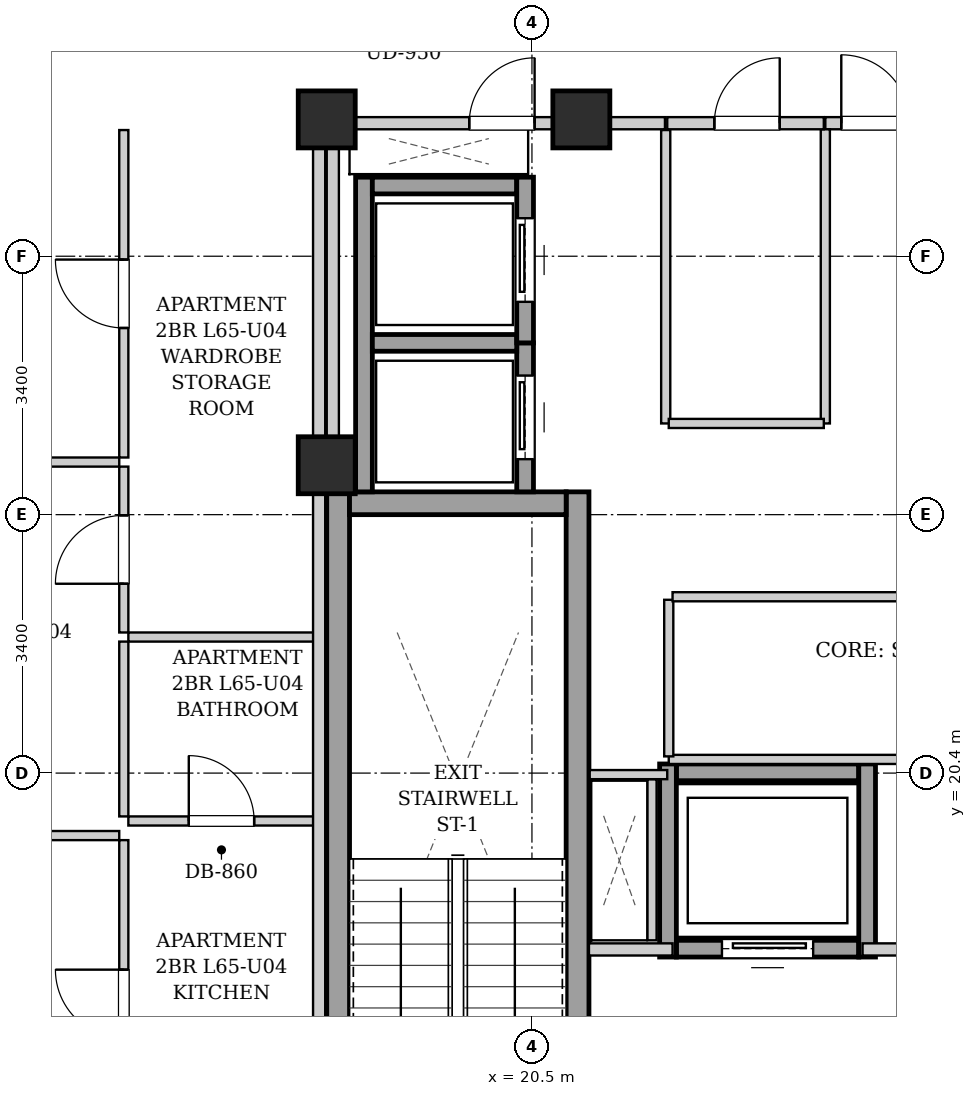
"""IFC4 building model, lengths in metres.
Left out: names, types, materials, properties, quantities, classifications, styles, units other than length and angle.
Written with IfcOpenShell. Run it as: python <this file> out.ifc"""

import sys

from ifc_helpers import new_model, si_unit, direction, frame, frame_2d, origin, origin_2d, place, context, subcontext, project, spatial, rectangle, extrude, element, fill, save


model = new_model("IFC4")
c1 = context("Model", 3, precision=1e-05, world=origin(), true_north=direction((0.0, 1.0)))
c2 = subcontext(c1, "Body", "Model", "MODEL_VIEW")
j1 = project(units=[si_unit("LENGTHUNIT", "METRE"), si_unit("PLANEANGLEUNIT", "RADIAN")], contexts=[c1])
p1 = place(None, origin())
s1 = spatial("IfcSite", under=j1, at=p1, CompositionType="ELEMENT")
p2 = place(p1, origin())
s2 = spatial("IfcBuilding", under=s1, at=p2, CompositionType="ELEMENT")
p3 = place(p2, frame((0.0, 0.0, 224.1)))
s3 = spatial("IfcBuildingStorey", under=s2, at=p3, CompositionType="ELEMENT", Elevation=224.1)
for number, where, z_axis, x_axis in (
    (1, (17.8, 29.0, 0.0), (0.0, 0.0, 1.0), (1.0, 0.0, 0.0)),
    (2, (21.15, 29.0, 0.0), (0.0, 0.0, 1.0), (1.0, 0.0, 0.0)),
    (3, (17.8, 24.45, 0.0), (0.0, 0.0, 1.0), (1.0, 0.0, 0.0)),
):
    element("IfcColumn", number, at=place(p3, frame(where, z_axis=z_axis, x_axis=x_axis)), inside=s3, PredefinedType="COLUMN", context=c2, shape_type="SweptSolid", body=[
        extrude(rectangle(XDim=0.75, YDim=0.75, at=origin_2d()), origin(), (0.0, 0.0, 1.0), 3.4),
    ])
for number, where, z_axis, x_axis in (
    (4, (17.95, 15.1, 0.0), (0.0, 0.0, 1.0), (0.0, 1.0, 0.0)),
    (5, (21.1, 15.1, 0.0), (0.0, 0.0, 1.0), (0.0, 1.0, 0.0)),
):
    element("IfcWall", number, at=place(p3, frame(where, z_axis=z_axis, x_axis=x_axis)), inside=s3, PredefinedType="SHEAR", context=c2, shape_type="SweptSolid", body=[
        extrude(rectangle(XDim=9.0, YDim=0.3, at=frame_2d((4.5, 0.0))), origin(), (0.0, 0.0, 1.0), 3.14),
    ])
p4 = place(p3, frame((18.1, 23.95, 0.0), z_axis=(0.0, 0.0, 1.0), x_axis=(1.0, 0.0, 0.0)))
e6 = element("IfcWall", 6, at=p4, inside=s3, PredefinedType="SHEAR", context=c2, shape_type="SweptSolid", body=[
    extrude(rectangle(XDim=2.85, YDim=0.3, at=frame_2d((1.425, 0.0))), origin(), (0.0, 0.0, 1.0), 3.14),
])
p5 = place(p3, frame((18.29, 24.1, 0.0), z_axis=(0.0, 0.0, 1.0), x_axis=(0.0, 1.0, 0.0)))
e7 = element("IfcWall", 7, at=p5, inside=s3, PredefinedType="SHEAR", context=c2, shape_type="SweptSolid", body=[
    extrude(rectangle(XDim=4.14, YDim=0.22, at=frame_2d((2.07, 0.0))), origin(), (0.0, 0.0, 1.0), 3.14),
])
p6 = place(p3, frame((20.41, 24.1, 0.0), z_axis=(0.0, 0.0, 1.0), x_axis=(0.0, 1.0, 0.0)))
e8 = element("IfcWall", 8, at=p6, inside=s3, PredefinedType="SHEAR", context=c2, shape_type="SweptSolid", body=[
    extrude(rectangle(XDim=1.96, YDim=0.22, at=frame_2d((0.98, 0.0))), origin(), (0.0, 0.0, 1.0), 3.14),
])
p7 = place(p6, frame((0.43, 0.0, 0.0)))
e9 = element("IfcOpeningElement", 9, at=p7, cuts=e8, PredefinedType="OPENING", context=c2, shape_type="SweptSolid", body=[
    extrude(rectangle(XDim=1.1, YDim=2.15, at=frame_2d((0.55, 1.075))), frame((0.0, 0.12, 0.0), z_axis=(0.0, -1.0, 0.0), x_axis=(1.0, 0.0, 0.0)), (0.0, 0.0, 1.0), 0.24),
])
for number, where, z_axis, x_axis in (
    (10, (18.4, 26.06, 0.0), (0.0, 0.0, 1.0), (1.0, 0.0, 0.0)),
    (11, (18.4, 28.13, 0.0), (0.0, 0.0, 1.0), (1.0, 0.0, 0.0)),
):
    element("IfcWall", number, at=place(p3, frame(where, z_axis=z_axis, x_axis=x_axis)), inside=s3, PredefinedType="SHEAR", context=c2, shape_type="SweptSolid", body=[
        extrude(rectangle(XDim=1.9, YDim=0.22, at=frame_2d((0.95, 0.0))), origin(), (0.0, 0.0, 1.0), 3.14),
    ])
p8 = place(p3, frame((20.41, 26.06, 0.0), z_axis=(0.0, 0.0, 1.0), x_axis=(0.0, 1.0, 0.0)))
e12 = element("IfcWall", 12, at=p8, inside=s3, PredefinedType="SHEAR", context=c2, shape_type="SweptSolid", body=[
    extrude(rectangle(XDim=2.18, YDim=0.22, at=frame_2d((1.09, 0.0))), origin(), (0.0, 0.0, 1.0), 3.14),
])
p9 = place(p8, frame((0.54, 0.0, 0.0)))
e13 = element("IfcOpeningElement", 13, at=p9, cuts=e12, PredefinedType="OPENING", context=c2, shape_type="SweptSolid", body=[
    extrude(rectangle(XDim=1.1, YDim=2.15, at=frame_2d((0.55, 1.075))), frame((0.0, 0.12, 0.0), z_axis=(0.0, -1.0, 0.0), x_axis=(1.0, 0.0, 0.0)), (0.0, 0.0, 1.0), 0.24),
])
p10 = place(p3, frame((22.4, 18.09, 0.0), z_axis=(0.0, 0.0, 1.0), x_axis=(1.0, 0.0, 0.0)))
e14 = element("IfcWall", 14, at=p10, inside=s3, PredefinedType="SHEAR", context=c2, shape_type="SweptSolid", body=[
    extrude(rectangle(XDim=2.4, YDim=0.22, at=frame_2d((1.2, 0.0))), origin(), (0.0, 0.0, 1.0), 3.14),
])
p11 = place(p10, frame((0.6, 0.0, 0.0)))
e15 = element("IfcOpeningElement", 15, at=p11, cuts=e14, PredefinedType="OPENING", context=c2, shape_type="SweptSolid", body=[
    extrude(rectangle(XDim=1.2, YDim=2.15, at=frame_2d((0.6, 1.075))), frame((0.0, 0.12, 0.0), z_axis=(0.0, -1.0, 0.0), x_axis=(1.0, 0.0, 0.0)), (0.0, 0.0, 1.0), 0.24),
])
p12 = place(p3, frame((22.4, 20.41, 0.0), z_axis=(0.0, 0.0, 1.0), x_axis=(1.0, 0.0, 0.0)))
e16 = element("IfcWall", 16, at=p12, inside=s3, PredefinedType="SHEAR", context=c2, shape_type="SweptSolid", body=[
    extrude(rectangle(XDim=2.4, YDim=0.22, at=frame_2d((1.2, 0.0))), origin(), (0.0, 0.0, 1.0), 3.14),
])
for number, where, z_axis, x_axis in (
    (17, (22.29, 17.98, 0.0), (0.0, 0.0, 1.0), (0.0, 1.0, 0.0)),
    (18, (24.91, 17.98, 0.0), (0.0, 0.0, 1.0), (0.0, 1.0, 0.0)),
):
    element("IfcWall", number, at=place(p3, frame(where, z_axis=z_axis, x_axis=x_axis)), inside=s3, PredefinedType="SHEAR", context=c2, shape_type="SweptSolid", body=[
        extrude(rectangle(XDim=2.54, YDim=0.22, at=frame_2d((1.27, 0.0))), origin(), (0.0, 0.0, 1.0), 3.14),
    ])
p13 = place(p3, frame((21.25, 18.08, 0.0), z_axis=(0.0, 0.0, 1.0), x_axis=(1.0, 0.0, 0.0)))
e19 = element("IfcWall", 19, at=p13, inside=s3, PredefinedType="PARTITIONING", context=c2, shape_type="SweptSolid", body=[
    extrude(rectangle(XDim=1.1, YDim=0.16, at=frame_2d((0.55, 0.0))), origin(), (0.0, 0.0, 1.0), 3.14),
])
p14 = place(p3, frame((24.85, 18.08, 0.0), z_axis=(0.0, 0.0, 1.0), x_axis=(1.0, 0.0, 0.0)))
e20 = element("IfcWall", 20, at=p14, inside=s3, PredefinedType="PARTITIONING", context=c2, shape_type="SweptSolid", body=[
    extrude(rectangle(XDim=1.3, YDim=0.16, at=frame_2d((0.65, 0.0))), origin(), (0.0, 0.0, 1.0), 3.14),
])
p15 = place(p3, frame((17.88, 24.12, 0.0), z_axis=(0.0, 0.0, 1.0), x_axis=(0.0, 1.0, 0.0)))
e21 = element("IfcWall", 21, at=p15, inside=s3, PredefinedType="PARTITIONING", context=c2, shape_type="SweptSolid", body=[
    extrude(rectangle(XDim=4.76, YDim=0.16, at=frame_2d((2.38, 0.0))), origin(), (0.0, 0.0, 1.0), 3.14),
])
p16 = place(p3, frame((24.36, 28.95, 0.0), z_axis=(0.0, 0.0, 1.0), x_axis=(1.0, 0.0, 0.0)))
e22 = element("IfcWall", 22, at=p16, inside=s3, PredefinedType="PARTITIONING", context=c2, shape_type="SweptSolid", body=[
    extrude(rectangle(XDim=1.32, YDim=0.16, at=frame_2d((0.66, 0.0))), origin(), (0.0, 0.0, 1.0), 2.668),
])
p17 = place(p16, frame((0.21, 0.0, 0.0)))
e23 = element("IfcOpeningElement", 23, at=p17, cuts=e22, PredefinedType="OPENING", context=c2, shape_type="SweptSolid", body=[
    extrude(rectangle(XDim=0.9, YDim=2.05, at=frame_2d((0.45, 1.025))), frame((0.0, 0.09, 0.0), z_axis=(0.0, -1.0, 0.0), x_axis=(1.0, 0.0, 0.0)), (0.0, 0.0, 1.0), 0.18),
])
p18 = place(p3, frame((17.96, 28.95, 0.0), z_axis=(0.0, 0.0, 1.0), x_axis=(1.0, 0.0, 0.0)))
e24 = element("IfcWall", 24, at=p18, inside=s3, PredefinedType="PARTITIONING", context=c2, shape_type="SweptSolid", body=[
    extrude(rectangle(XDim=4.29, YDim=0.16, at=frame_2d((2.145, 0.0))), origin(), (0.0, 0.0, 1.0), 2.668),
])
p19 = place(p18, frame((1.715, 0.0, 0.0)))
e25 = element("IfcOpeningElement", 25, at=p19, cuts=e24, PredefinedType="OPENING", context=c2, shape_type="SweptSolid", body=[
    extrude(rectangle(XDim=0.86, YDim=2.05, at=frame_2d((0.43, 1.025))), frame((0.0, 0.09, 0.0), z_axis=(0.0, -1.0, 0.0), x_axis=(1.0, 0.0, 0.0)), (0.0, 0.0, 1.0), 0.18),
])
p20 = place(p3, frame((22.08, 18.2, 0.0), z_axis=(0.0, 0.0, 1.0), x_axis=(0.0, 1.0, 0.0)))
e26 = element("IfcWall", 26, at=p20, inside=s3, PredefinedType="PARTITIONING", context=c2, shape_type="SweptSolid", body=[
    extrude(rectangle(XDim=2.12, YDim=0.12, at=frame_2d((1.06, 0.0))), origin(), (0.0, 0.0, 1.0), 3.14),
])
p21 = place(p3, frame((22.28, 20.38, 0.0), z_axis=(0.0, 0.0, 1.0), x_axis=(-1.0, 0.0, 0.0)))
e27 = element("IfcWall", 27, at=p21, inside=s3, PredefinedType="PARTITIONING", context=c2, shape_type="SweptSolid", body=[
    extrude(rectangle(XDim=1.02, YDim=0.12, at=frame_2d((0.51, 0.0))), origin(), (0.0, 0.0, 1.0), 3.14),
])
p22 = place(p3, frame((24.36, 25.0, 0.0), z_axis=(0.0, 0.0, 1.0), x_axis=(0.0, 1.0, 0.0)))
e28 = element("IfcWall", 28, at=p22, inside=s3, PredefinedType="PARTITIONING", context=c2, shape_type="SweptSolid", body=[
    extrude(rectangle(XDim=3.87, YDim=0.12, at=frame_2d((1.935, 0.0))), origin(), (0.0, 0.0, 1.0), 3.14),
])
p23 = place(p3, frame((22.26, 25.0, 0.0), z_axis=(0.0, 0.0, 1.0), x_axis=(0.0, 1.0, 0.0)))
e29 = element("IfcWall", 29, at=p23, inside=s3, PredefinedType="PARTITIONING", context=c2, shape_type="SweptSolid", body=[
    extrude(rectangle(XDim=3.86, YDim=0.12, at=frame_2d((1.93, 0.0))), origin(), (0.0, 0.0, 1.0), 3.14),
])
p24 = place(p3, frame((22.3, 25.0, 0.0), z_axis=(0.0, 0.0, 1.0), x_axis=(1.0, 0.0, 0.0)))
e30 = element("IfcWall", 30, at=p24, inside=s3, PredefinedType="PARTITIONING", context=c2, shape_type="SweptSolid", body=[
    extrude(rectangle(XDim=2.04, YDim=0.12, at=frame_2d((1.02, 0.0))), origin(), (0.0, 0.0, 1.0), 3.14),
])
p25 = place(p3, frame((22.28, 28.95, 0.0), z_axis=(0.0, 0.0, 1.0), x_axis=(1.0, 0.0, 0.0)))
e31 = element("IfcWall", 31, at=p25, inside=s3, PredefinedType="PARTITIONING", context=c2, shape_type="SweptSolid", body=[
    extrude(rectangle(XDim=2.06, YDim=0.16, at=frame_2d((1.03, 0.0))), origin(), (0.0, 0.0, 1.0), 2.668),
])
p26 = place(p25, frame((0.62, 0.0, 0.0)))
e32 = element("IfcOpeningElement", 32, at=p26, cuts=e31, PredefinedType="OPENING", context=c2, shape_type="SweptSolid", body=[
    extrude(rectangle(XDim=0.86, YDim=2.05, at=frame_2d((0.43, 1.025))), frame((0.0, 0.09, 0.0), z_axis=(0.0, -1.0, 0.0), x_axis=(1.0, 0.0, 0.0)), (0.0, 0.0, 1.0), 0.18),
])
p27 = place(p3, frame((22.3, 20.58, 0.0), z_axis=(0.0, 0.0, 1.0), x_axis=(1.0, 0.0, 0.0)))
e33 = element("IfcWall", 33, at=p27, inside=s3, PredefinedType="PARTITIONING", context=c2, shape_type="SweptSolid", body=[
    extrude(rectangle(XDim=7.35, YDim=0.12, at=frame_2d((3.675, 0.0))), origin(), (0.0, 0.0, 1.0), 3.14),
])
p28 = place(p3, frame((22.3, 20.62, 0.0), z_axis=(0.0, 0.0, 1.0), x_axis=(0.0, 1.0, 0.0)))
e34 = element("IfcWall", 34, at=p28, inside=s3, PredefinedType="PARTITIONING", context=c2, shape_type="SweptSolid", body=[
    extrude(rectangle(XDim=2.06, YDim=0.12, at=frame_2d((1.03, 0.0))), origin(), (0.0, 0.0, 1.0), 3.14),
])
p29 = place(p3, frame((22.35, 22.72, 0.0), z_axis=(0.0, 0.0, 1.0), x_axis=(1.0, 0.0, 0.0)))
e35 = element("IfcWall", 35, at=p29, inside=s3, PredefinedType="PARTITIONING", context=c2, shape_type="SweptSolid", body=[
    extrude(rectangle(XDim=7.27, YDim=0.12, at=frame_2d((3.635, 0.0))), origin(), (0.0, 0.0, 1.0), 3.14),
])
p30 = place(p29, frame((3.25, 0.0, 0.0)))
e36 = element("IfcOpeningElement", 36, at=p30, cuts=e35, PredefinedType="OPENING", context=c2, shape_type="SweptSolid", body=[
    extrude(rectangle(XDim=0.9, YDim=2.05, at=frame_2d((0.45, 1.025))), frame((0.0, 0.07, 0.0), z_axis=(0.0, -1.0, 0.0), x_axis=(1.0, 0.0, 0.0)), (0.0, 0.0, 1.0), 0.14),
])
p31 = place(p3, frame((15.19, 22.19, 0.0), z_axis=(0.0, 0.0, 1.0), x_axis=(1.0, 0.0, 0.0)))
e37 = element("IfcWall", 37, at=p31, inside=s3, PredefinedType="PARTITIONING", context=c2, shape_type="SweptSolid", body=[
    extrude(rectangle(XDim=2.45, YDim=0.12, at=frame_2d((1.225, 0.0))), origin(), (0.0, 0.0, 1.0), 3.14),
])
p32 = place(p3, frame((15.13, 22.25, 0.0), z_axis=(0.0, 0.0, 1.0), x_axis=(0.0, 1.0, 0.0)))
e38 = element("IfcWall", 38, at=p32, inside=s3, PredefinedType="PARTITIONING", context=c2, shape_type="SweptSolid", body=[
    extrude(rectangle(XDim=2.182, YDim=0.12, at=frame_2d((1.091, 0.0))), origin(), (0.0, 0.0, 1.0), 3.14),
])
p33 = place(p32, frame((0.641, 0.0, 0.0)))
e39 = element("IfcOpeningElement", 39, at=p33, cuts=e38, PredefinedType="OPENING", context=c2, shape_type="SweptSolid", body=[
    extrude(rectangle(XDim=0.9, YDim=2.05, at=frame_2d((0.45, 1.025))), frame((0.0, 0.07, 0.0), z_axis=(0.0, -1.0, 0.0), x_axis=(1.0, 0.0, 0.0)), (0.0, 0.0, 1.0), 0.14),
])
p34 = place(p3, frame((15.13, 24.552, 0.0), z_axis=(0.0, 0.0, 1.0), x_axis=(0.0, 1.0, 0.0)))
e40 = element("IfcWall", 40, at=p34, inside=s3, PredefinedType="PARTITIONING", context=c2, shape_type="SweptSolid", body=[
    extrude(rectangle(XDim=4.308, YDim=0.12, at=frame_2d((2.154, 0.0))), origin(), (0.0, 0.0, 1.0), 3.14),
])
p35 = place(p34, frame((1.704, 0.0, 0.0)))
e41 = element("IfcOpeningElement", 41, at=p35, cuts=e40, PredefinedType="OPENING", context=c2, shape_type="SweptSolid", body=[
    extrude(rectangle(XDim=0.9, YDim=2.05, at=frame_2d((0.45, 1.025))), frame((0.0, 0.07, 0.0), z_axis=(0.0, -1.0, 0.0), x_axis=(1.0, 0.0, 0.0)), (0.0, 0.0, 1.0), 0.14),
])
p36 = place(p3, frame((15.19, 19.77, 0.0), z_axis=(0.0, 0.0, 1.0), x_axis=(1.0, 0.0, 0.0)))
e42 = element("IfcWall", 42, at=p36, inside=s3, PredefinedType="PARTITIONING", context=c2, shape_type="SweptSolid", body=[
    extrude(rectangle(XDim=2.45, YDim=0.12, at=frame_2d((1.225, 0.0))), origin(), (0.0, 0.0, 1.0), 3.14),
])
p37 = place(p36, frame((0.795, 0.0, 0.0)))
e43 = element("IfcOpeningElement", 43, at=p37, cuts=e42, PredefinedType="OPENING", context=c2, shape_type="SweptSolid", body=[
    extrude(rectangle(XDim=0.86, YDim=2.05, at=frame_2d((0.43, 1.025))), frame((0.0, 0.07, 0.0), z_axis=(0.0, -1.0, 0.0), x_axis=(1.0, 0.0, 0.0)), (0.0, 0.0, 1.0), 0.14),
])
p38 = place(p3, frame((15.13, 19.83, 0.0), z_axis=(0.0, 0.0, 1.0), x_axis=(0.0, 1.0, 0.0)))
e44 = element("IfcWall", 44, at=p38, inside=s3, PredefinedType="PARTITIONING", context=c2, shape_type="SweptSolid", body=[
    extrude(rectangle(XDim=2.3, YDim=0.12, at=frame_2d((1.15, 0.0))), origin(), (0.0, 0.0, 1.0), 3.14),
])
p39 = place(p3, frame((15.13, 15.21, 0.0), z_axis=(0.0, 0.0, 1.0), x_axis=(0.0, 1.0, 0.0)))
e45 = element("IfcWall", 45, at=p39, inside=s3, PredefinedType="PARTITIONING", context=c2, shape_type="SweptSolid", body=[
    extrude(rectangle(XDim=4.308, YDim=0.12, at=frame_2d((2.154, 0.0))), origin(), (0.0, 0.0, 1.0), 3.14),
])
p40 = place(p39, frame((1.704, 0.0, 0.0)))
e46 = element("IfcOpeningElement", 46, at=p40, cuts=e45, PredefinedType="OPENING", context=c2, shape_type="SweptSolid", body=[
    extrude(rectangle(XDim=0.9, YDim=2.05, at=frame_2d((0.45, 1.025))), frame((0.0, 0.07, 0.0), z_axis=(0.0, -1.0, 0.0), x_axis=(1.0, 0.0, 0.0)), (0.0, 0.0, 1.0), 0.14),
])
p41 = place(p3, frame((10.88, 19.578, 0.0), z_axis=(0.0, 0.0, 1.0), x_axis=(1.0, 0.0, 0.0)))
e47 = element("IfcWall", 47, at=p41, inside=s3, PredefinedType="PARTITIONING", context=c2, shape_type="SweptSolid", body=[
    extrude(rectangle(XDim=4.19, YDim=0.12, at=frame_2d((2.095, 0.0))), origin(), (0.0, 0.0, 1.0), 3.14),
])
p42 = place(p41, frame((1.63, 0.0, 0.0)))
e48 = element("IfcOpeningElement", 48, at=p42, cuts=e47, PredefinedType="OPENING", context=c2, shape_type="SweptSolid", body=[
    extrude(rectangle(XDim=0.9, YDim=2.05, at=frame_2d((0.45, 1.025))), frame((0.0, 0.07, 0.0), z_axis=(0.0, -1.0, 0.0), x_axis=(1.0, 0.0, 0.0)), (0.0, 0.0, 1.0), 0.14),
])
p43 = place(p3, frame((10.88, 24.492, 0.0), z_axis=(0.0, 0.0, 1.0), x_axis=(1.0, 0.0, 0.0)))
e49 = element("IfcWall", 49, at=p43, inside=s3, PredefinedType="PARTITIONING", context=c2, shape_type="SweptSolid", body=[
    extrude(rectangle(XDim=4.19, YDim=0.12, at=frame_2d((2.095, 0.0))), origin(), (0.0, 0.0, 1.0), 2.878),
])
p44 = place(p43, frame((1.63, 0.0, 0.0)))
e50 = element("IfcOpeningElement", 50, at=p44, cuts=e49, PredefinedType="OPENING", context=c2, shape_type="SweptSolid", body=[
    extrude(rectangle(XDim=0.9, YDim=2.05, at=frame_2d((0.45, 1.025))), frame((0.0, 0.07, 0.0), z_axis=(0.0, -1.0, 0.0), x_axis=(1.0, 0.0, 0.0)), (0.0, 0.0, 1.0), 0.14),
])
p45 = place(p3, frame((17.7, 15.02, 0.0), z_axis=(0.0, 0.0, 1.0), x_axis=(0.0, 1.0, 0.0)))
e51 = element("IfcWall", 51, at=p45, inside=s3, PredefinedType="PARTITIONING", context=c2, shape_type="SweptSolid", body=[
    extrude(rectangle(XDim=13.98, YDim=0.16, at=frame_2d((6.99, 0.0))), origin(), (0.0, 0.0, 1.0), 3.14),
])
p46 = place(p7, origin())
e52 = element("IfcDoor", 52, at=p46, inside=s3, OperationType="SLIDING_TO_LEFT", PredefinedType="DOOR", context=c2, shape_type="SweptSolid", body=[
    extrude(rectangle(XDim=1.1, YDim=2.15, at=frame_2d((0.55, 1.075))), frame((0.0, 0.025, 0.0), z_axis=(0.0, -1.0, 0.0), x_axis=(1.0, 0.0, 0.0)), (0.0, 0.0, 1.0), 0.05),
])
fill(e9, e52)
p47 = place(p9, origin())
e53 = element("IfcDoor", 53, at=p47, inside=s3, OperationType="SLIDING_TO_LEFT", PredefinedType="DOOR", context=c2, shape_type="SweptSolid", body=[
    extrude(rectangle(XDim=1.1, YDim=2.15, at=frame_2d((0.55, 1.075))), frame((0.0, 0.025, 0.0), z_axis=(0.0, -1.0, 0.0), x_axis=(1.0, 0.0, 0.0)), (0.0, 0.0, 1.0), 0.05),
])
fill(e13, e53)
p48 = place(p11, origin())
e54 = element("IfcDoor", 54, at=p48, inside=s3, OperationType="SLIDING_TO_LEFT", PredefinedType="DOOR", context=c2, shape_type="SweptSolid", body=[
    extrude(rectangle(XDim=1.2, YDim=2.15, at=frame_2d((0.6, 1.075))), frame((0.0, 0.025, 0.0), z_axis=(0.0, -1.0, 0.0), x_axis=(1.0, 0.0, 0.0)), (0.0, 0.0, 1.0), 0.05),
])
fill(e15, e54)
p49 = place(p17, origin())
e55 = element("IfcDoor", 55, at=p49, inside=s3, OperationType="SINGLE_SWING_LEFT", PredefinedType="DOOR", context=c2, shape_type="SweptSolid", body=[
    extrude(rectangle(XDim=0.9, YDim=2.05, at=frame_2d((0.45, 1.025))), frame((0.0, 0.025, 0.0), z_axis=(0.0, -1.0, 0.0), x_axis=(1.0, 0.0, 0.0)), (0.0, 0.0, 1.0), 0.05),
])
fill(e23, e55)
p50 = place(p19, origin())
e56 = element("IfcDoor", 56, at=p50, inside=s3, OperationType="SINGLE_SWING_RIGHT", PredefinedType="DOOR", context=c2, shape_type="SweptSolid", body=[
    extrude(rectangle(XDim=0.86, YDim=2.05, at=frame_2d((0.43, 1.025))), frame((0.0, 0.025, 0.0), z_axis=(0.0, -1.0, 0.0), x_axis=(1.0, 0.0, 0.0)), (0.0, 0.0, 1.0), 0.05),
])
fill(e25, e56)
p51 = place(p26, origin())
e57 = element("IfcDoor", 57, at=p51, inside=s3, OperationType="SINGLE_SWING_RIGHT", PredefinedType="DOOR", context=c2, shape_type="SweptSolid", body=[
    extrude(rectangle(XDim=0.86, YDim=2.05, at=frame_2d((0.43, 1.025))), frame((0.0, 0.025, 0.0), z_axis=(0.0, -1.0, 0.0), x_axis=(1.0, 0.0, 0.0)), (0.0, 0.0, 1.0), 0.05),
])
fill(e32, e57)
p52 = place(p33, origin())
e58 = element("IfcDoor", 58, at=p52, inside=s3, OperationType="SINGLE_SWING_LEFT", PredefinedType="DOOR", context=c2, shape_type="SweptSolid", body=[
    extrude(rectangle(XDim=0.9, YDim=2.05, at=frame_2d((0.45, 1.025))), frame((0.0, 0.025, 0.0), z_axis=(0.0, -1.0, 0.0), x_axis=(1.0, 0.0, 0.0)), (0.0, 0.0, 1.0), 0.05),
])
fill(e39, e58)
p53 = place(p35, origin())
e59 = element("IfcDoor", 59, at=p53, inside=s3, OperationType="SINGLE_SWING_RIGHT", PredefinedType="DOOR", context=c2, shape_type="SweptSolid", body=[
    extrude(rectangle(XDim=0.9, YDim=2.05, at=frame_2d((0.45, 1.025))), frame((0.0, 0.025, 0.0), z_axis=(0.0, -1.0, 0.0), x_axis=(1.0, 0.0, 0.0)), (0.0, 0.0, 1.0), 0.05),
])
fill(e41, e59)
p54 = place(p37, origin())
e60 = element("IfcDoor", 60, at=p54, inside=s3, OperationType="SINGLE_SWING_LEFT", PredefinedType="DOOR", context=c2, shape_type="SweptSolid", body=[
    extrude(rectangle(XDim=0.86, YDim=2.05, at=frame_2d((0.43, 1.025))), frame((0.0, 0.025, 0.0), z_axis=(0.0, -1.0, 0.0), x_axis=(1.0, 0.0, 0.0)), (0.0, 0.0, 1.0), 0.05),
])
fill(e43, e60)
p55 = place(p40, origin())
e61 = element("IfcDoor", 61, at=p55, inside=s3, OperationType="SINGLE_SWING_RIGHT", PredefinedType="DOOR", context=c2, shape_type="SweptSolid", body=[
    extrude(rectangle(XDim=0.9, YDim=2.05, at=frame_2d((0.45, 1.025))), frame((0.0, 0.025, 0.0), z_axis=(0.0, -1.0, 0.0), x_axis=(1.0, 0.0, 0.0)), (0.0, 0.0, 1.0), 0.05),
])
fill(e46, e61)
save(model, sys.argv[1])
